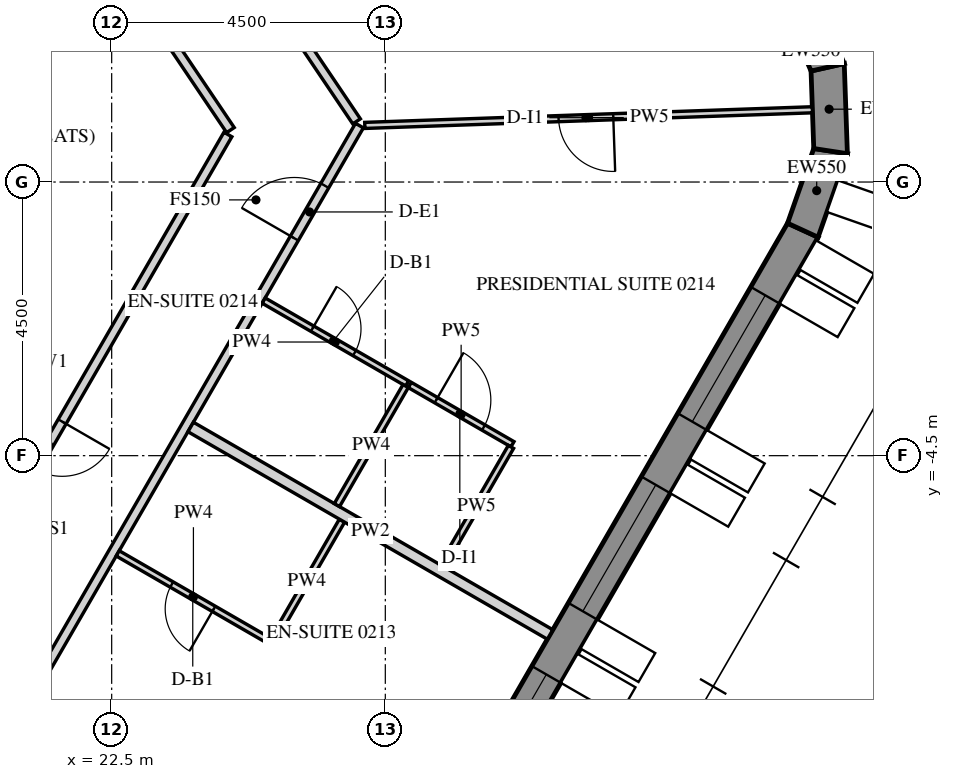
"""IFC4 building model, lengths in metres.
Left out: names, types, materials, properties, quantities, classifications, styles, units other than length and angle.
Written with IfcOpenShell. Run it as: python <this file> out.ifc"""

import sys

from ifc_helpers import new_model, si_unit, direction, frame, frame_2d, origin, place, context, subcontext, project, spatial, polyline, rectangle, outline, extrude, element, fill, save


model = new_model("IFC4")
c1 = context("Model", 3, precision=1e-05, world=origin(), true_north=direction((0.0, 1.0)))
c2 = subcontext(c1, "Body", "Model", "MODEL_VIEW")
j1 = project(units=[si_unit("LENGTHUNIT", "METRE"), si_unit("PLANEANGLEUNIT", "RADIAN")], contexts=[c1])
p1 = place(None, origin())
s1 = spatial("IfcSite", under=j1, at=p1, CompositionType="ELEMENT")
p2 = place(p1, origin())
s2 = spatial("IfcBuilding", under=s1, at=p2, CompositionType="ELEMENT")
p3 = place(p2, frame((0.0, 0.0, 49.2)))
s3 = spatial("IfcBuildingStorey", under=s2, at=p3, CompositionType="ELEMENT", Elevation=49.2)
p4 = place(p3, frame((18.83, -26.835, -0.15), z_axis=(0.0, 0.0, 1.0), x_axis=(0.500003800416, 0.866023209602, 0.0)))
e1 = element("IfcWall", 1, at=p4, inside=s3, PredefinedType="SOLIDWALL", context=c2, shape_type="SweptSolid", body=[
    extrude(outline(polyline([(-0.022, -0.275), (30.097, -0.275), (30.045, 0.275), (0.022, 0.275), (-0.022, -0.275)])), origin(), (0.0, 0.0, 1.0), 3.9),
])
p5 = place(p4, frame((1.236, 0.0, 1.05)))
e2 = element("IfcOpeningElement", 2, at=p5, cuts=e1, PredefinedType="OPENING", context=c2, shape_type="SweptSolid", body=[
    extrude(rectangle(XDim=2.4, YDim=2.4, at=frame_2d((1.2, 1.2))), frame((0.0, 0.285, 0.0), z_axis=(0.0, -1.0, 0.0), x_axis=(1.0, 0.0, 0.0)), (0.0, 0.0, 1.0), 0.57),
])
p6 = place(p4, frame((4.835, 0.0, 1.05)))
e3 = element("IfcOpeningElement", 3, at=p6, cuts=e1, PredefinedType="OPENING", context=c2, shape_type="SweptSolid", body=[
    extrude(rectangle(XDim=2.4, YDim=2.4, at=frame_2d((1.2, 1.2))), frame((0.0, 0.285, 0.0), z_axis=(0.0, -1.0, 0.0), x_axis=(1.0, 0.0, 0.0)), (0.0, 0.0, 1.0), 0.57),
])
p7 = place(p4, frame((8.436, 0.0, 1.05)))
e4 = element("IfcOpeningElement", 4, at=p7, cuts=e1, PredefinedType="OPENING", context=c2, shape_type="SweptSolid", body=[
    extrude(rectangle(XDim=2.4, YDim=2.4, at=frame_2d((1.2, 1.2))), frame((0.0, 0.285, 0.0), z_axis=(0.0, -1.0, 0.0), x_axis=(1.0, 0.0, 0.0)), (0.0, 0.0, 1.0), 0.57),
])
p8 = place(p4, frame((12.035, 0.0, 1.05)))
e5 = element("IfcOpeningElement", 5, at=p8, cuts=e1, PredefinedType="OPENING", context=c2, shape_type="SweptSolid", body=[
    extrude(rectangle(XDim=2.4, YDim=2.4, at=frame_2d((1.2, 1.2))), frame((0.0, 0.285, 0.0), z_axis=(0.0, -1.0, 0.0), x_axis=(1.0, 0.0, 0.0)), (0.0, 0.0, 1.0), 0.57),
])
p9 = place(p4, frame((15.635, 0.0, 1.05)))
e6 = element("IfcOpeningElement", 6, at=p9, cuts=e1, PredefinedType="OPENING", context=c2, shape_type="SweptSolid", body=[
    extrude(rectangle(XDim=2.4, YDim=2.4, at=frame_2d((1.2, 1.2))), frame((0.0, 0.285, 0.0), z_axis=(0.0, -1.0, 0.0), x_axis=(1.0, 0.0, 0.0)), (0.0, 0.0, 1.0), 0.57),
])
p10 = place(p4, frame((19.236, 0.0, 1.05)))
e7 = element("IfcOpeningElement", 7, at=p10, cuts=e1, PredefinedType="OPENING", context=c2, shape_type="SweptSolid", body=[
    extrude(rectangle(XDim=2.4, YDim=2.4, at=frame_2d((1.2, 1.2))), frame((0.0, 0.285, 0.0), z_axis=(0.0, -1.0, 0.0), x_axis=(1.0, 0.0, 0.0)), (0.0, 0.0, 1.0), 0.57),
])
p11 = place(p4, frame((22.835, 0.0, 1.05)))
e8 = element("IfcOpeningElement", 8, at=p11, cuts=e1, PredefinedType="OPENING", context=c2, shape_type="SweptSolid", body=[
    extrude(rectangle(XDim=2.4, YDim=2.4, at=frame_2d((1.2, 1.2))), frame((0.0, 0.285, 0.0), z_axis=(0.0, -1.0, 0.0), x_axis=(1.0, 0.0, 0.0)), (0.0, 0.0, 1.0), 0.57),
])
p12 = place(p4, frame((26.436, 0.0, 1.05)))
e9 = element("IfcOpeningElement", 9, at=p12, cuts=e1, PredefinedType="OPENING", context=c2, shape_type="SweptSolid", body=[
    extrude(rectangle(XDim=2.4, YDim=2.4, at=frame_2d((1.2, 1.2))), frame((0.0, 0.285, 0.0), z_axis=(0.0, -1.0, 0.0), x_axis=(1.0, 0.0, 0.0)), (0.0, 0.0, 1.0), 0.57),
])
p13 = place(p3, frame((33.866, -0.792, -0.15), z_axis=(0.0, 0.0, 1.0), x_axis=(0.33111537203, 0.943590276765, 0.0)))
e10 = element("IfcWall", 10, at=p13, inside=s3, PredefinedType="SOLIDWALL", context=c2, shape_type="SweptSolid", body=[
    extrude(outline(polyline([(-0.026, -0.275), (1.431, -0.275), (1.327, 0.275), (0.026, 0.275), (-0.026, -0.275)])), origin(), (0.0, 0.0, 1.0), 3.9),
])
p14 = place(p3, frame((34.323, 0.509, -0.15), z_axis=(0.0, 0.0, 1.0), x_axis=(-0.034876908462, 0.999391615562, 0.0)))
e11 = element("IfcWall", 11, at=p14, inside=s3, PredefinedType="SOLIDWALL", context=c2, shape_type="SweptSolid", body=[
    extrude(outline(polyline([(-0.052, -0.275), (1.431, -0.275), (1.327, 0.275), (0.052, 0.275), (-0.052, -0.275)])), origin(), (0.0, 0.0, 1.0), 3.9),
])
p15 = place(p3, frame((34.274, 1.887, -0.15), z_axis=(0.0, 0.0, 1.0), x_axis=(-0.396161342798, 0.918180913803, 0.0)))
e12 = element("IfcWall", 12, at=p15, inside=s3, PredefinedType="SOLIDWALL", context=c2, shape_type="SweptSolid", body=[
    extrude(outline(polyline([(-0.052, -0.275), (1.405, -0.275), (1.354, 0.275), (0.052, 0.275), (-0.052, -0.275)])), origin(), (0.0, 0.0, 1.0), 3.9),
])
p16 = place(p3, frame((14.275, -20.375, 0.0), z_axis=(0.0, 0.0, 1.0), x_axis=(0.500001098408, 0.866024769617, 0.0)))
e13 = element("IfcWall", 13, at=p16, inside=s3, PredefinedType="PARTITIONING", context=c2, shape_type="SweptSolid", body=[
    extrude(rectangle(XDim=24.599, YDim=0.15, at=frame_2d((12.299, 0.0))), origin(), (0.0, 0.0, 1.0), 2.988),
])
p17 = place(p16, frame((3.016, 0.0, 0.0)))
e14 = element("IfcOpeningElement", 14, at=p17, cuts=e13, PredefinedType="OPENING", context=c2, shape_type="SweptSolid", body=[
    extrude(rectangle(XDim=1.0, YDim=2.1, at=frame_2d((0.5, 1.05))), frame((0.0, 0.085, 0.0), z_axis=(0.0, -1.0, 0.0), x_axis=(1.0, 0.0, 0.0)), (0.0, 0.0, 1.0), 0.17),
])
p18 = place(p16, frame((10.019, 0.0, 0.0)))
e15 = element("IfcOpeningElement", 15, at=p18, cuts=e13, PredefinedType="OPENING", context=c2, shape_type="SweptSolid", body=[
    extrude(rectangle(XDim=1.0, YDim=2.1, at=frame_2d((0.5, 1.05))), frame((0.0, 0.085, 0.0), z_axis=(0.0, -1.0, 0.0), x_axis=(1.0, 0.0, 0.0)), (0.0, 0.0, 1.0), 0.17),
])
p19 = place(p16, frame((22.459, 0.0, 0.0)))
e16 = element("IfcOpeningElement", 16, at=p19, cuts=e13, PredefinedType="OPENING", context=c2, shape_type="SweptSolid", body=[
    extrude(rectangle(XDim=1.0, YDim=2.1, at=frame_2d((0.5, 1.05))), frame((0.0, 0.085, 0.0), z_axis=(0.0, -1.0, 0.0), x_axis=(1.0, 0.0, 0.0)), (0.0, 0.0, 1.0), 0.17),
])
p20 = place(p3, frame((26.528, 0.997, 0.0), z_axis=(0.0, 0.0, 1.0), x_axis=(-0.559192121846, 0.829038099767, 0.0)))
e17 = element("IfcWall", 17, at=p20, inside=s3, PredefinedType="PARTITIONING", context=c2, shape_type="SweptSolid", body=[
    extrude(rectangle(XDim=22.586, YDim=0.15, at=frame_2d((11.293, 0.0))), origin(), (0.0, 0.0, 1.0), 2.988),
])
p21 = place(p20, frame((11.696, 0.0, 0.0)))
e18 = element("IfcOpeningElement", 18, at=p21, cuts=e17, PredefinedType="OPENING", context=c2, shape_type="SweptSolid", body=[
    extrude(rectangle(XDim=1.0, YDim=2.1, at=frame_2d((0.5, 1.05))), frame((0.0, 0.085, 0.0), z_axis=(0.0, -1.0, 0.0), x_axis=(1.0, 0.0, 0.0)), (0.0, 0.0, 1.0), 0.17),
])
p22 = place(p20, frame((17.733, 0.0, 0.0)))
e19 = element("IfcOpeningElement", 19, at=p22, cuts=e17, PredefinedType="OPENING", context=c2, shape_type="SweptSolid", body=[
    extrude(rectangle(XDim=1.0, YDim=2.1, at=frame_2d((0.5, 1.05))), frame((0.0, 0.085, 0.0), z_axis=(0.0, -1.0, 0.0), x_axis=(1.0, 0.0, 0.0)), (0.0, 0.0, 1.0), 0.17),
])
p23 = place(p3, frame((18.661, 9.441, 0.0), z_axis=(0.0, 0.0, 1.0), x_axis=(0.559206469148, -0.829028422229, 0.0)))
e20 = element("IfcWall", 20, at=p23, inside=s3, PredefinedType="PARTITIONING", context=c2, shape_type="SweptSolid", body=[
    extrude(rectangle(XDim=10.358, YDim=0.15, at=frame_2d((5.179, 0.0))), origin(), (0.0, 0.0, 1.0), 2.988),
])
p24 = place(p3, frame((24.411, 0.782, 0.0), z_axis=(0.0, 0.0, 1.0), x_axis=(-0.499996383721, -0.866027491634, 0.0)))
e21 = element("IfcWall", 21, at=p24, inside=s3, PredefinedType="PARTITIONING", context=c2, shape_type="SweptSolid", body=[
    extrude(rectangle(XDim=11.804, YDim=0.15, at=frame_2d((5.902, 0.0))), origin(), (0.0, 0.0, 1.0), 2.988),
])
p25 = place(p24, frame((5.452, 0.0, 0.0)))
e22 = element("IfcOpeningElement", 22, at=p25, cuts=e21, PredefinedType="OPENING", context=c2, shape_type="SweptSolid", body=[
    extrude(rectangle(XDim=0.9, YDim=2.1, at=frame_2d((0.45, 1.05))), frame((0.0, 0.085, 0.0), z_axis=(0.0, -1.0, 0.0), x_axis=(1.0, 0.0, 0.0)), (0.0, 0.0, 1.0), 0.17),
])
p26 = place(p3, frame((26.288, -5.569, 0.0), z_axis=(0.0, 0.0, 1.0), x_axis=(-0.500015210774, -0.866016621662, 0.0)))
e23 = element("IfcWall", 23, at=p26, inside=s3, PredefinedType="PARTITIONING", context=c2, shape_type="SweptSolid", body=[
    extrude(rectangle(XDim=2.31, YDim=0.1, at=frame_2d((1.155, 0.0))), origin(), (0.0, 0.0, 1.0), 2.988),
])
p27 = place(p3, frame((25.089, -7.544, 0.0), z_axis=(0.0, 0.0, 1.0), x_axis=(-0.866018712932, 0.500011588718, 0.0)))
e24 = element("IfcWall", 24, at=p27, inside=s3, PredefinedType="PARTITIONING", context=c2, shape_type="SweptSolid", body=[
    extrude(rectangle(XDim=2.875, YDim=0.1, at=frame_2d((1.438, 0.0))), origin(), (0.0, 0.0, 1.0), 2.988),
])
p28 = place(p27, frame((1.05, 0.0, 0.0)))
e25 = element("IfcOpeningElement", 25, at=p28, cuts=e24, PredefinedType="OPENING", context=c2, shape_type="SweptSolid", body=[
    extrude(rectangle(XDim=0.8, YDim=2.1, at=frame_2d((0.4, 1.05))), frame((0.0, 0.06, 0.0), z_axis=(0.0, -1.0, 0.0), x_axis=(1.0, 0.0, 0.0)), (0.0, 0.0, 1.0), 0.12),
])
p29 = place(p3, frame((29.71, -7.441, 0.0), z_axis=(0.0, 0.0, 1.0), x_axis=(-0.866019982719, 0.500009389444, 0.0)))
e26 = element("IfcWall", 26, at=p29, inside=s3, PredefinedType="PARTITIONING", context=c2, shape_type="SweptSolid", body=[
    extrude(rectangle(XDim=6.825, YDim=0.18, at=frame_2d((3.413, 0.0))), origin(), (0.0, 0.0, 1.0), 2.988),
])
p30 = place(p3, frame((24.999, -1.95, 0.0), z_axis=(0.0, 0.0, 1.0), x_axis=(0.866073700213, -0.499916338801, 0.0)))
e27 = element("IfcWall", 27, at=p30, inside=s3, PredefinedType="PARTITIONING", context=c2, shape_type="SweptSolid", body=[
    extrude(rectangle(XDim=2.725, YDim=0.1, at=frame_2d((1.363, 0.0))), origin(), (0.0, 0.0, 1.0), 2.988),
])
p31 = place(p30, frame((0.925, 0.0, 0.0)))
e28 = element("IfcOpeningElement", 28, at=p31, cuts=e27, PredefinedType="OPENING", context=c2, shape_type="SweptSolid", body=[
    extrude(rectangle(XDim=0.8, YDim=2.1, at=frame_2d((0.4, 1.05))), frame((0.0, 0.06, 0.0), z_axis=(0.0, -1.0, 0.0), x_axis=(1.0, 0.0, 0.0)), (0.0, 0.0, 1.0), 0.12),
])
p32 = place(p3, frame((27.403, -3.337, 0.0), z_axis=(0.0, 0.0, 1.0), x_axis=(0.866054235095, -0.49995005938, 0.0)))
e29 = element("IfcWall", 29, at=p32, inside=s3, PredefinedType="PARTITIONING", context=c2, shape_type="SweptSolid", body=[
    extrude(rectangle(XDim=1.95, YDim=0.1, at=frame_2d((0.975, 0.0))), origin(), (0.0, 0.0, 1.0), 2.988),
])
p33 = place(p32, frame((0.5, 0.0, 0.0)))
e30 = element("IfcOpeningElement", 30, at=p33, cuts=e29, PredefinedType="OPENING", context=c2, shape_type="SweptSolid", body=[
    extrude(rectangle(XDim=0.9, YDim=2.1, at=frame_2d((0.45, 1.05))), frame((0.0, 0.06, 0.0), z_axis=(0.0, -1.0, 0.0), x_axis=(1.0, 0.0, 0.0)), (0.0, 0.0, 1.0), 0.12),
])
p34 = place(p3, frame((29.066, -4.356, 0.0), z_axis=(0.0, 0.0, 1.0), x_axis=(-0.500031020067, -0.8660074936, 0.0)))
e31 = element("IfcWall", 31, at=p34, inside=s3, PredefinedType="PARTITIONING", context=c2, shape_type="SweptSolid", body=[
    extrude(rectangle(XDim=2.26, YDim=0.1, at=frame_2d((1.13, 0.0))), origin(), (0.0, 0.0, 1.0), 2.988),
])
p35 = place(p3, frame((34.023, 1.188, 0.0), z_axis=(0.0, 0.0, 1.0), x_axis=(-0.999390666539, -0.034904091936, 0.0)))
e32 = element("IfcWall", 32, at=p35, inside=s3, PredefinedType="PARTITIONING", context=c2, shape_type="SweptSolid", body=[
    extrude(rectangle(XDim=7.365, YDim=0.1, at=frame_2d((3.683, 0.0))), origin(), (0.0, 0.0, 1.0), 2.988),
])
p36 = place(p35, frame((3.277, 0.0, 0.0)))
e33 = element("IfcOpeningElement", 33, at=p36, cuts=e32, PredefinedType="OPENING", context=c2, shape_type="SweptSolid", body=[
    extrude(rectangle(XDim=0.9, YDim=2.1, at=frame_2d((0.45, 1.05))), frame((0.0, 0.06, 0.0), z_axis=(0.0, -1.0, 0.0), x_axis=(1.0, 0.0, 0.0)), (0.0, 0.0, 1.0), 0.12),
])
p37 = place(p3, frame((26.204, -5.313, 0.0), z_axis=(0.0, 0.0, 1.0), x_axis=(0.49995000081, 0.866054268906, 0.0)))
e34 = element("IfcWall", 34, at=p37, inside=s3, PredefinedType="PARTITIONING", context=c2, shape_type="SweptSolid", body=[
    extrude(rectangle(XDim=2.26, YDim=0.1, at=frame_2d((1.13, 0.0))), origin(), (0.0, 0.0, 1.0), 2.988),
])
p38 = place(p10, frame((0.0, 0.205, 0.0)))
e35 = element("IfcWindow", 35, at=p38, inside=s3, PartitioningType="DOUBLE_PANEL_VERTICAL", PredefinedType="WINDOW", context=c2, shape_type="SweptSolid", body=[
    extrude(rectangle(XDim=2.4, YDim=2.4, at=frame_2d((1.2, 1.2))), frame((0.0, 0.03, 0.0), z_axis=(0.0, -1.0, 0.0), x_axis=(1.0, 0.0, 0.0)), (0.0, 0.0, 1.0), 0.06),
])
fill(e7, e35)
p39 = place(p11, frame((0.0, 0.205, 0.0)))
e36 = element("IfcWindow", 36, at=p39, inside=s3, PartitioningType="DOUBLE_PANEL_VERTICAL", PredefinedType="WINDOW", context=c2, shape_type="SweptSolid", body=[
    extrude(rectangle(XDim=2.4, YDim=2.4, at=frame_2d((1.2, 1.2))), frame((0.0, 0.03, 0.0), z_axis=(0.0, -1.0, 0.0), x_axis=(1.0, 0.0, 0.0)), (0.0, 0.0, 1.0), 0.06),
])
fill(e8, e36)
p40 = place(p12, frame((0.0, 0.205, 0.0)))
e37 = element("IfcWindow", 37, at=p40, inside=s3, PartitioningType="DOUBLE_PANEL_VERTICAL", PredefinedType="WINDOW", context=c2, shape_type="SweptSolid", body=[
    extrude(rectangle(XDim=2.4, YDim=2.4, at=frame_2d((1.2, 1.2))), frame((0.0, 0.03, 0.0), z_axis=(0.0, -1.0, 0.0), x_axis=(1.0, 0.0, 0.0)), (0.0, 0.0, 1.0), 0.06),
])
fill(e9, e37)
p41 = place(p28, origin())
e38 = element("IfcDoor", 38, at=p41, inside=s3, OperationType="SINGLE_SWING_LEFT", PredefinedType="DOOR", context=c2, shape_type="SweptSolid", body=[
    extrude(rectangle(XDim=0.8, YDim=2.1, at=frame_2d((0.4, 1.05))), frame((0.0, 0.025, 0.0), z_axis=(0.0, -1.0, 0.0), x_axis=(1.0, 0.0, 0.0)), (0.0, 0.0, 1.0), 0.05),
])
fill(e25, e38)
p42 = place(p19, origin())
e39 = element("IfcDoor", 39, at=p42, inside=s3, OperationType="SINGLE_SWING_LEFT", PredefinedType="DOOR", context=c2, shape_type="SweptSolid", body=[
    extrude(rectangle(XDim=1.0, YDim=2.1, at=frame_2d((0.5, 1.05))), frame((0.0, 0.025, 0.0), z_axis=(0.0, -1.0, 0.0), x_axis=(1.0, 0.0, 0.0)), (0.0, 0.0, 1.0), 0.05),
])
fill(e16, e39)
p43 = place(p31, origin())
e40 = element("IfcDoor", 40, at=p43, inside=s3, OperationType="SINGLE_SWING_RIGHT", PredefinedType="DOOR", context=c2, shape_type="SweptSolid", body=[
    extrude(rectangle(XDim=0.8, YDim=2.1, at=frame_2d((0.4, 1.05))), frame((0.0, 0.025, 0.0), z_axis=(0.0, -1.0, 0.0), x_axis=(1.0, 0.0, 0.0)), (0.0, 0.0, 1.0), 0.05),
])
fill(e28, e40)
p44 = place(p33, origin())
e41 = element("IfcDoor", 41, at=p44, inside=s3, OperationType="SINGLE_SWING_RIGHT", PredefinedType="DOOR", context=c2, shape_type="SweptSolid", body=[
    extrude(rectangle(XDim=0.9, YDim=2.1, at=frame_2d((0.45, 1.05))), frame((0.0, 0.025, 0.0), z_axis=(0.0, -1.0, 0.0), x_axis=(1.0, 0.0, 0.0)), (0.0, 0.0, 1.0), 0.05),
])
fill(e30, e41)
p45 = place(p36, origin())
e42 = element("IfcDoor", 42, at=p45, inside=s3, OperationType="SINGLE_SWING_LEFT", PredefinedType="DOOR", context=c2, shape_type="SweptSolid", body=[
    extrude(rectangle(XDim=0.9, YDim=2.1, at=frame_2d((0.45, 1.05))), frame((0.0, 0.025, 0.0), z_axis=(0.0, -1.0, 0.0), x_axis=(1.0, 0.0, 0.0)), (0.0, 0.0, 1.0), 0.05),
])
fill(e33, e42)
p46 = place(p25, origin())
e43 = element("IfcDoor", 43, at=p46, inside=s3, OperationType="SINGLE_SWING_RIGHT", PredefinedType="DOOR", context=c2, shape_type="SweptSolid", body=[
    extrude(rectangle(XDim=0.9, YDim=2.1, at=frame_2d((0.45, 1.05))), frame((0.0, 0.025, 0.0), z_axis=(0.0, -1.0, 0.0), x_axis=(1.0, 0.0, 0.0)), (0.0, 0.0, 1.0), 0.05),
])
fill(e22, e43)
save(model, sys.argv[1])
